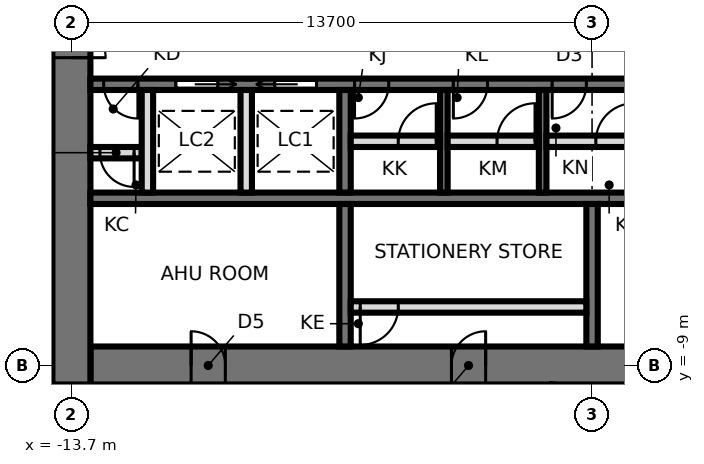
"""IFC4 building model, lengths in metres.
Left out: names, types, materials, properties, quantities, classifications, styles, units other than length and angle.
Written with IfcOpenShell. Run it as: python <this file> out.ifc"""

import sys

from ifc_helpers import new_model, si_unit, direction, frame, frame_2d, origin, place, context, subcontext, project, spatial, rectangle, extrude, element, fill, save


model = new_model("IFC4")
c1 = context("Model", 3, precision=1e-05, world=origin(), true_north=direction((0.0, 1.0)))
c2 = subcontext(c1, "Body", "Model", "MODEL_VIEW")
j1 = project(units=[si_unit("LENGTHUNIT", "METRE"), si_unit("PLANEANGLEUNIT", "RADIAN")], contexts=[c1])
p1 = place(None, origin())
s1 = spatial("IfcSite", under=j1, at=p1, CompositionType="ELEMENT")
p2 = place(p1, origin())
s2 = spatial("IfcBuilding", under=s1, at=p2, CompositionType="ELEMENT")
p3 = place(p2, frame((0.0, 0.0, 172.1)))
s3 = spatial("IfcBuildingStorey", under=s2, at=p3, CompositionType="ELEMENT", Elevation=172.1)
p4 = place(p3, frame((-13.2, -9.0, 0.0), z_axis=(0.0, 0.0, 1.0), x_axis=(1.0, 0.0, 0.0)))
e1 = element("IfcWall", 1, at=p4, inside=s3, PredefinedType="SHEAR", context=c2, shape_type="SweptSolid", body=[
    extrude(rectangle(XDim=26.4, YDim=1.0, at=frame_2d((13.2, 0.0))), origin(), (0.0, 0.0, 1.0), 3.9),
])
p5 = place(p4, frame((2.65, 0.0, 0.0)))
e2 = element("IfcOpeningElement", 2, at=p5, cuts=e1, PredefinedType="OPENING", context=c2, shape_type="SweptSolid", body=[
    extrude(rectangle(XDim=0.9, YDim=2.1, at=frame_2d((0.45, 1.05))), frame((0.0, 0.51, 0.0), z_axis=(0.0, -1.0, 0.0), x_axis=(1.0, 0.0, 0.0)), (0.0, 0.0, 1.0), 1.02),
])
p6 = place(p4, frame((9.5, 0.0, 0.0)))
e3 = element("IfcOpeningElement", 3, at=p6, cuts=e1, PredefinedType="OPENING", context=c2, shape_type="SweptSolid", body=[
    extrude(rectangle(XDim=0.9, YDim=2.1, at=frame_2d((0.45, 1.05))), frame((0.0, 0.51, 0.0), z_axis=(0.0, -1.0, 0.0), x_axis=(1.0, 0.0, 0.0)), (0.0, 0.0, 1.0), 1.02),
])
p7 = place(p4, frame((16.0, 0.0, 0.0)))
e4 = element("IfcOpeningElement", 4, at=p7, cuts=e1, PredefinedType="OPENING", context=c2, shape_type="SweptSolid", body=[
    extrude(rectangle(XDim=0.9, YDim=2.1, at=frame_2d((0.45, 1.05))), frame((0.0, 0.51, 0.0), z_axis=(0.0, -1.0, 0.0), x_axis=(1.0, 0.0, 0.0)), (0.0, 0.0, 1.0), 1.02),
])
p8 = place(p4, frame((22.85, 0.0, 0.0)))
e5 = element("IfcOpeningElement", 5, at=p8, cuts=e1, PredefinedType="OPENING", context=c2, shape_type="SweptSolid", body=[
    extrude(rectangle(XDim=0.9, YDim=2.1, at=frame_2d((0.45, 1.05))), frame((0.0, 0.51, 0.0), z_axis=(0.0, -1.0, 0.0), x_axis=(1.0, 0.0, 0.0)), (0.0, 0.0, 1.0), 1.02),
])
p9 = place(p3, frame((-13.7, 9.5, 0.0), z_axis=(0.0, 0.0, 1.0), x_axis=(0.0, -1.0, 0.0)))
e6 = element("IfcWall", 6, at=p9, inside=s3, PredefinedType="SHEAR", context=c2, shape_type="SweptSolid", body=[
    extrude(rectangle(XDim=19.0, YDim=1.0, at=frame_2d((9.5, 0.0))), origin(), (0.0, 0.0, 1.0), 3.9),
])
p10 = place(p9, frame((8.6, 0.0, 0.0)))
e7 = element("IfcOpeningElement", 7, at=p10, cuts=e6, PredefinedType="OPENING", context=c2, shape_type="SweptSolid", body=[
    extrude(rectangle(XDim=1.8, YDim=2.4, at=frame_2d((0.9, 1.2))), frame((0.0, 0.51, 0.0), z_axis=(0.0, -1.0, 0.0), x_axis=(1.0, 0.0, 0.0)), (0.0, 0.0, 1.0), 1.02),
])
p11 = place(p3, frame((-13.2, -1.6, 0.0), z_axis=(0.0, 0.0, 1.0), x_axis=(1.0, 0.0, 0.0)))
e8 = element("IfcWall", 8, at=p11, inside=s3, PredefinedType="SHEAR", context=c2, shape_type="SweptSolid", body=[
    extrude(rectangle(XDim=26.4, YDim=0.3, at=frame_2d((13.2, 0.0))), origin(), (0.0, 0.0, 1.0), 3.9),
])
p12 = place(p11, frame((25.15, 0.0, 0.0)))
e9 = element("IfcOpeningElement", 9, at=p12, cuts=e8, PredefinedType="OPENING", context=c2, shape_type="SweptSolid", body=[
    extrude(rectangle(XDim=1.0, YDim=2.1, at=frame_2d((0.5, 1.05))), frame((0.0, 0.16, 0.0), z_axis=(0.0, -1.0, 0.0), x_axis=(1.0, 0.0, 0.0)), (0.0, 0.0, 1.0), 0.32),
])
p13 = place(p11, frame((6.95, 0.0, 0.0)))
e10 = element("IfcOpeningElement", 10, at=p13, cuts=e8, PredefinedType="OPENING", context=c2, shape_type="SweptSolid", body=[
    extrude(rectangle(XDim=0.9, YDim=2.1, at=frame_2d((0.45, 1.05))), frame((0.0, 0.16, 0.0), z_axis=(0.0, -1.0, 0.0), x_axis=(1.0, 0.0, 0.0)), (0.0, 0.0, 1.0), 0.32),
])
p14 = place(p11, frame((9.55, 0.0, 0.0)))
e11 = element("IfcOpeningElement", 11, at=p14, cuts=e8, PredefinedType="OPENING", context=c2, shape_type="SweptSolid", body=[
    extrude(rectangle(XDim=0.9, YDim=2.1, at=frame_2d((0.45, 1.05))), frame((0.0, 0.16, 0.0), z_axis=(0.0, -1.0, 0.0), x_axis=(1.0, 0.0, 0.0)), (0.0, 0.0, 1.0), 0.32),
])
p15 = place(p11, frame((12.15, 0.0, 0.0)))
e12 = element("IfcOpeningElement", 12, at=p15, cuts=e8, PredefinedType="OPENING", context=c2, shape_type="SweptSolid", body=[
    extrude(rectangle(XDim=0.9, YDim=2.1, at=frame_2d((0.45, 1.05))), frame((0.0, 0.16, 0.0), z_axis=(0.0, -1.0, 0.0), x_axis=(1.0, 0.0, 0.0)), (0.0, 0.0, 1.0), 0.32),
])
p16 = place(p11, frame((15.25, 0.0, 0.0)))
e13 = element("IfcOpeningElement", 13, at=p16, cuts=e8, PredefinedType="OPENING", context=c2, shape_type="SweptSolid", body=[
    extrude(rectangle(XDim=1.1, YDim=2.3, at=frame_2d((0.55, 1.15))), frame((0.0, 0.16, 0.0), z_axis=(0.0, -1.0, 0.0), x_axis=(1.0, 0.0, 0.0)), (0.0, 0.0, 1.0), 0.32),
])
p17 = place(p11, frame((17.85, 0.0, 0.0)))
e14 = element("IfcOpeningElement", 14, at=p17, cuts=e8, PredefinedType="OPENING", context=c2, shape_type="SweptSolid", body=[
    extrude(rectangle(XDim=1.1, YDim=2.3, at=frame_2d((0.55, 1.15))), frame((0.0, 0.16, 0.0), z_axis=(0.0, -1.0, 0.0), x_axis=(1.0, 0.0, 0.0)), (0.0, 0.0, 1.0), 0.32),
])
p18 = place(p11, frame((4.85, 0.0, 0.0)))
e15 = element("IfcOpeningElement", 15, at=p18, cuts=e8, PredefinedType="OPENING", context=c2, shape_type="SweptSolid", body=[
    extrude(rectangle(XDim=1.1, YDim=2.3, at=frame_2d((0.55, 1.15))), frame((0.0, 0.16, 0.0), z_axis=(0.0, -1.0, 0.0), x_axis=(1.0, 0.0, 0.0)), (0.0, 0.0, 1.0), 0.32),
])
p19 = place(p11, frame((2.25, 0.0, 0.0)))
e16 = element("IfcOpeningElement", 16, at=p19, cuts=e8, PredefinedType="OPENING", context=c2, shape_type="SweptSolid", body=[
    extrude(rectangle(XDim=1.1, YDim=2.3, at=frame_2d((0.55, 1.15))), frame((0.0, 0.16, 0.0), z_axis=(0.0, -1.0, 0.0), x_axis=(1.0, 0.0, 0.0)), (0.0, 0.0, 1.0), 0.32),
])
p20 = place(p11, frame((0.35, 0.0, 0.0)))
e17 = element("IfcOpeningElement", 17, at=p20, cuts=e8, PredefinedType="OPENING", context=c2, shape_type="SweptSolid", body=[
    extrude(rectangle(XDim=0.9, YDim=2.1, at=frame_2d((0.45, 1.05))), frame((0.0, 0.16, 0.0), z_axis=(0.0, -1.0, 0.0), x_axis=(1.0, 0.0, 0.0)), (0.0, 0.0, 1.0), 0.32),
])
p21 = place(p3, frame((-13.2, -4.6, 0.0), z_axis=(0.0, 0.0, 1.0), x_axis=(1.0, 0.0, 0.0)))
e18 = element("IfcWall", 18, at=p21, inside=s3, PredefinedType="SHEAR", context=c2, shape_type="SweptSolid", body=[
    extrude(rectangle(XDim=26.4, YDim=0.3, at=frame_2d((13.2, 0.0))), origin(), (0.0, 0.0, 1.0), 3.9),
])
p22 = place(p3, frame((-6.5, -1.75, 0.0), z_axis=(0.0, 0.0, 1.0), x_axis=(0.0, -1.0, 0.0)))
e19 = element("IfcWall", 19, at=p22, inside=s3, PredefinedType="SHEAR", context=c2, shape_type="SweptSolid", body=[
    extrude(rectangle(XDim=2.7, YDim=0.3, at=frame_2d((1.35, 0.0))), origin(), (0.0, 0.0, 1.0), 3.9),
])
p23 = place(p3, frame((-6.5, -4.75, 0.0), z_axis=(0.0, 0.0, 1.0), x_axis=(0.0, -1.0, 0.0)))
e20 = element("IfcWall", 20, at=p23, inside=s3, PredefinedType="SHEAR", context=c2, shape_type="SweptSolid", body=[
    extrude(rectangle(XDim=3.75, YDim=0.3, at=frame_2d((1.875, 0.0))), origin(), (0.0, 0.0, 1.0), 3.9),
])
for number, where, z_axis, x_axis in (
    (21, (-3.9, -1.75, 0.0), (0.0, 0.0, 1.0), (0.0, -1.0, 0.0)),
    (22, (-1.3, -1.75, 0.0), (0.0, 0.0, 1.0), (0.0, -1.0, 0.0)),
):
    element("IfcWall", number, at=place(p3, frame(where, z_axis=z_axis, x_axis=x_axis)), inside=s3, PredefinedType="SHEAR", context=c2, shape_type="SweptSolid", body=[
        extrude(rectangle(XDim=2.7, YDim=0.2, at=frame_2d((1.35, 0.0))), origin(), (0.0, 0.0, 1.0), 3.9),
    ])
p24 = place(p3, frame((0.0, -4.75, 0.0), z_axis=(0.0, 0.0, 1.0), x_axis=(0.0, -1.0, 0.0)))
e23 = element("IfcWall", 23, at=p24, inside=s3, PredefinedType="SHEAR", context=c2, shape_type="SweptSolid", body=[
    extrude(rectangle(XDim=3.75, YDim=0.3, at=frame_2d((1.875, 0.0))), origin(), (0.0, 0.0, 1.0), 3.9),
])
p25 = place(p3, frame((-6.35, -3.1, 0.0), z_axis=(0.0, 0.0, 1.0), x_axis=(1.0, 0.0, 0.0)))
e24 = element("IfcWall", 24, at=p25, inside=s3, PredefinedType="PARTITIONING", context=c2, shape_type="SweptSolid", body=[
    extrude(rectangle(XDim=2.35, YDim=0.3, at=frame_2d((1.175, 0.0))), origin(), (0.0, 0.0, 1.0), 3.74),
])
p26 = place(p25, frame((1.25, 0.0, 0.0)))
e25 = element("IfcOpeningElement", 25, at=p26, cuts=e24, PredefinedType="OPENING", context=c2, shape_type="SweptSolid", body=[
    extrude(rectangle(XDim=1.0, YDim=2.4, at=frame_2d((0.5, 1.2))), frame((0.0, 0.16, 0.0), z_axis=(0.0, -1.0, 0.0), x_axis=(1.0, 0.0, 0.0)), (0.0, 0.0, 1.0), 0.32),
])
p27 = place(p3, frame((-3.8, -3.1, 0.0), z_axis=(0.0, 0.0, 1.0), x_axis=(1.0, 0.0, 0.0)))
e26 = element("IfcWall", 26, at=p27, inside=s3, PredefinedType="PARTITIONING", context=c2, shape_type="SweptSolid", body=[
    extrude(rectangle(XDim=2.4, YDim=0.3, at=frame_2d((1.2, 0.0))), origin(), (0.0, 0.0, 1.0), 3.74),
])
p28 = place(p27, frame((1.3, 0.0, 0.0)))
e27 = element("IfcOpeningElement", 27, at=p28, cuts=e26, PredefinedType="OPENING", context=c2, shape_type="SweptSolid", body=[
    extrude(rectangle(XDim=1.0, YDim=2.4, at=frame_2d((0.5, 1.2))), frame((0.0, 0.16, 0.0), z_axis=(0.0, -1.0, 0.0), x_axis=(1.0, 0.0, 0.0)), (0.0, 0.0, 1.0), 0.32),
])
p29 = place(p3, frame((-1.2, -3.1, 0.0), z_axis=(0.0, 0.0, 1.0), x_axis=(1.0, 0.0, 0.0)))
e28 = element("IfcWall", 28, at=p29, inside=s3, PredefinedType="PARTITIONING", context=c2, shape_type="SweptSolid", body=[
    extrude(rectangle(XDim=2.4, YDim=0.3, at=frame_2d((1.2, 0.0))), origin(), (0.0, 0.0, 1.0), 3.74),
])
p30 = place(p29, frame((1.3, 0.0, 0.0)))
e29 = element("IfcOpeningElement", 29, at=p30, cuts=e28, PredefinedType="OPENING", context=c2, shape_type="SweptSolid", body=[
    extrude(rectangle(XDim=1.0, YDim=2.4, at=frame_2d((0.5, 1.2))), frame((0.0, 0.16, 0.0), z_axis=(0.0, -1.0, 0.0), x_axis=(1.0, 0.0, 0.0)), (0.0, 0.0, 1.0), 0.32),
])
p31 = place(p3, frame((-6.35, -7.46, 0.0), z_axis=(0.0, 0.0, 1.0), x_axis=(1.0, 0.0, 0.0)))
e30 = element("IfcWall", 30, at=p31, inside=s3, PredefinedType="PARTITIONING", context=c2, shape_type="SweptSolid", body=[
    extrude(rectangle(XDim=6.2, YDim=0.3, at=frame_2d((3.1, 0.0))), origin(), (0.0, 0.0, 1.0), 3.74),
])
p32 = place(p31, frame((0.25, 0.0, 0.0)))
e31 = element("IfcOpeningElement", 31, at=p32, cuts=e30, PredefinedType="OPENING", context=c2, shape_type="SweptSolid", body=[
    extrude(rectangle(XDim=1.0, YDim=2.4, at=frame_2d((0.5, 1.2))), frame((0.0, 0.16, 0.0), z_axis=(0.0, -1.0, 0.0), x_axis=(1.0, 0.0, 0.0)), (0.0, 0.0, 1.0), 0.32),
])
p33 = place(p3, frame((-13.2, -3.4, 0.0), z_axis=(0.0, 0.0, 1.0), x_axis=(1.0, 0.0, 0.0)))
e32 = element("IfcWall", 32, at=p33, inside=s3, PredefinedType="SOLIDWALL", context=c2, shape_type="SweptSolid", body=[
    extrude(rectangle(XDim=1.35, YDim=0.3, at=frame_2d((0.675, 0.0))), origin(), (0.0, 0.0, 1.0), 3.74),
])
p34 = place(p33, frame((0.25, 0.0, 0.0)))
e33 = element("IfcOpeningElement", 33, at=p34, cuts=e32, PredefinedType="OPENING", context=c2, shape_type="SweptSolid", body=[
    extrude(rectangle(XDim=0.9, YDim=2.1, at=frame_2d((0.45, 1.05))), frame((0.0, 0.16, 0.0), z_axis=(0.0, -1.0, 0.0), x_axis=(1.0, 0.0, 0.0)), (0.0, 0.0, 1.0), 0.32),
])
for number, where, z_axis, x_axis in (
    (34, (-9.1, -1.75, 0.0), (0.0, 0.0, 1.0), (0.0, -1.0, 0.0)),
    (35, (-11.7, -1.75, 0.0), (0.0, 0.0, 1.0), (0.0, -1.0, 0.0)),
):
    element("IfcWall", number, at=place(p3, frame(where, z_axis=z_axis, x_axis=x_axis)), inside=s3, PredefinedType="SOLIDWALL", context=c2, shape_type="SweptSolid", body=[
        extrude(rectangle(XDim=2.7, YDim=0.3, at=frame_2d((1.35, 0.0))), origin(), (0.0, 0.0, 1.0), 3.74),
    ])
p35 = place(p3, frame((-2.196, -20.896, 0.0), z_axis=(0.0, 0.0, 1.0), x_axis=(0.104527293836, 0.99452201828, 0.0)))
e36 = element("IfcWall", 36, at=p35, inside=s3, PredefinedType="PARTITIONING", context=c2, shape_type="SweptSolid", body=[
    extrude(rectangle(XDim=11.459, YDim=0.12, at=frame_2d((5.729, 0.0))), origin(), (0.0, 0.0, 1.0), 3.74),
])
p36 = place(p35, frame((5.254, 0.0, 0.0)))
e37 = element("IfcOpeningElement", 37, at=p36, cuts=e36, PredefinedType="OPENING", context=c2, shape_type="SweptSolid", body=[
    extrude(rectangle(XDim=1.0, YDim=2.4, at=frame_2d((0.5, 1.2))), frame((0.0, 0.07, 0.0), z_axis=(0.0, -1.0, 0.0), x_axis=(1.0, 0.0, 0.0)), (0.0, 0.0, 1.0), 0.14),
])
p37 = place(p10, origin())
e38 = element("IfcDoor", 38, at=p37, inside=s3, OperationType="DOUBLE_DOOR_SINGLE_SWING", PredefinedType="DOOR", context=c2, shape_type="SweptSolid", body=[
    extrude(rectangle(XDim=1.72, YDim=2.36, at=frame_2d((0.9, 1.18))), frame((0.0, 0.025, 0.0), z_axis=(0.0, -1.0, 0.0), x_axis=(1.0, 0.0, 0.0)), (0.0, 0.0, 1.0), 0.05),
    extrude(rectangle(XDim=0.04, YDim=2.4, at=frame_2d((0.02, 1.2))), frame((0.0, 0.25, 0.0), z_axis=(0.0, -1.0, 0.0), x_axis=(1.0, 0.0, 0.0)), (0.0, 0.0, 1.0), 0.5),
    extrude(rectangle(XDim=0.04, YDim=2.4, at=frame_2d((1.78, 1.2))), frame((0.0, 0.25, 0.0), z_axis=(0.0, -1.0, 0.0), x_axis=(1.0, 0.0, 0.0)), (0.0, 0.0, 1.0), 0.5),
    extrude(rectangle(XDim=1.72, YDim=0.04, at=frame_2d((0.9, 2.38))), frame((0.0, 0.25, 0.0), z_axis=(0.0, -1.0, 0.0), x_axis=(1.0, 0.0, 0.0)), (0.0, 0.0, 1.0), 0.5),
])
fill(e7, e38)
p38 = place(p26, origin())
e39 = element("IfcDoor", 39, at=p38, inside=s3, OperationType="SINGLE_SWING_RIGHT", PredefinedType="DOOR", context=c2, shape_type="SweptSolid", body=[
    extrude(rectangle(XDim=1.0, YDim=2.4, at=frame_2d((0.5, 1.2))), frame((0.0, 0.025, 0.0), z_axis=(0.0, -1.0, 0.0), x_axis=(1.0, 0.0, 0.0)), (0.0, 0.0, 1.0), 0.05),
])
fill(e25, e39)
p39 = place(p13, frame((0.9, 0.0, 0.0), z_axis=(0.0, 0.0, 1.0), x_axis=(-1.0, 0.0, 0.0)))
e40 = element("IfcDoor", 40, at=p39, inside=s3, OperationType="SINGLE_SWING_RIGHT", PredefinedType="DOOR", context=c2, shape_type="SweptSolid", body=[
    extrude(rectangle(XDim=0.9, YDim=2.1, at=frame_2d((0.45, 1.05))), frame((0.0, 0.025, 0.0), z_axis=(0.0, -1.0, 0.0), x_axis=(1.0, 0.0, 0.0)), (0.0, 0.0, 1.0), 0.05),
])
fill(e10, e40)
p40 = place(p28, origin())
e41 = element("IfcDoor", 41, at=p40, inside=s3, OperationType="SINGLE_SWING_RIGHT", PredefinedType="DOOR", context=c2, shape_type="SweptSolid", body=[
    extrude(rectangle(XDim=1.0, YDim=2.4, at=frame_2d((0.5, 1.2))), frame((0.0, 0.025, 0.0), z_axis=(0.0, -1.0, 0.0), x_axis=(1.0, 0.0, 0.0)), (0.0, 0.0, 1.0), 0.05),
])
fill(e27, e41)
p41 = place(p14, frame((0.9, 0.0, 0.0), z_axis=(0.0, 0.0, 1.0), x_axis=(-1.0, 0.0, 0.0)))
e42 = element("IfcDoor", 42, at=p41, inside=s3, OperationType="SINGLE_SWING_RIGHT", PredefinedType="DOOR", context=c2, shape_type="SweptSolid", body=[
    extrude(rectangle(XDim=0.9, YDim=2.1, at=frame_2d((0.45, 1.05))), frame((0.0, 0.025, 0.0), z_axis=(0.0, -1.0, 0.0), x_axis=(1.0, 0.0, 0.0)), (0.0, 0.0, 1.0), 0.05),
])
fill(e11, e42)
p42 = place(p30, origin())
e43 = element("IfcDoor", 43, at=p42, inside=s3, OperationType="SINGLE_SWING_RIGHT", PredefinedType="DOOR", context=c2, shape_type="SweptSolid", body=[
    extrude(rectangle(XDim=1.0, YDim=2.4, at=frame_2d((0.5, 1.2))), frame((0.0, 0.025, 0.0), z_axis=(0.0, -1.0, 0.0), x_axis=(1.0, 0.0, 0.0)), (0.0, 0.0, 1.0), 0.05),
])
fill(e29, e43)
p43 = place(p15, frame((0.9, 0.0, 0.0), z_axis=(0.0, 0.0, 1.0), x_axis=(-1.0, 0.0, 0.0)))
e44 = element("IfcDoor", 44, at=p43, inside=s3, OperationType="SINGLE_SWING_RIGHT", PredefinedType="DOOR", context=c2, shape_type="SweptSolid", body=[
    extrude(rectangle(XDim=0.9, YDim=2.1, at=frame_2d((0.45, 1.05))), frame((0.0, 0.025, 0.0), z_axis=(0.0, -1.0, 0.0), x_axis=(1.0, 0.0, 0.0)), (0.0, 0.0, 1.0), 0.05),
])
fill(e12, e44)
p44 = place(p18, frame((1.1, 0.0, 0.0), z_axis=(0.0, 0.0, 1.0), x_axis=(-1.0, 0.0, 0.0)))
e45 = element("IfcDoor", 45, at=p44, inside=s3, OperationType="SLIDING_TO_RIGHT", PredefinedType="DOOR", context=c2, shape_type="SweptSolid", body=[
    extrude(rectangle(XDim=1.1, YDim=2.3, at=frame_2d((0.55, 1.15))), frame((0.0, 0.025, 0.0), z_axis=(0.0, -1.0, 0.0), x_axis=(1.0, 0.0, 0.0)), (0.0, 0.0, 1.0), 0.05),
])
fill(e15, e45)
p45 = place(p19, frame((1.1, 0.0, 0.0), z_axis=(0.0, 0.0, 1.0), x_axis=(-1.0, 0.0, 0.0)))
e46 = element("IfcDoor", 46, at=p45, inside=s3, OperationType="SLIDING_TO_LEFT", PredefinedType="DOOR", context=c2, shape_type="SweptSolid", body=[
    extrude(rectangle(XDim=1.1, YDim=2.3, at=frame_2d((0.55, 1.15))), frame((0.0, 0.025, 0.0), z_axis=(0.0, -1.0, 0.0), x_axis=(1.0, 0.0, 0.0)), (0.0, 0.0, 1.0), 0.05),
])
fill(e16, e46)
p46 = place(p20, frame((0.9, 0.0, 0.0), z_axis=(0.0, 0.0, 1.0), x_axis=(-1.0, 0.0, 0.0)))
e47 = element("IfcDoor", 47, at=p46, inside=s3, OperationType="SINGLE_SWING_LEFT", PredefinedType="DOOR", context=c2, shape_type="SweptSolid", body=[
    extrude(rectangle(XDim=0.9, YDim=2.1, at=frame_2d((0.45, 1.05))), frame((0.0, 0.025, 0.0), z_axis=(0.0, -1.0, 0.0), x_axis=(1.0, 0.0, 0.0)), (0.0, 0.0, 1.0), 0.05),
])
fill(e17, e47)
p47 = place(p5, origin())
e48 = element("IfcDoor", 48, at=p47, inside=s3, OperationType="SINGLE_SWING_LEFT", PredefinedType="DOOR", context=c2, shape_type="SweptSolid", body=[
    extrude(rectangle(XDim=0.82, YDim=2.06, at=frame_2d((0.45, 1.03))), frame((0.0, 0.025, 0.0), z_axis=(0.0, -1.0, 0.0), x_axis=(1.0, 0.0, 0.0)), (0.0, 0.0, 1.0), 0.05),
    extrude(rectangle(XDim=0.04, YDim=2.1, at=frame_2d((0.02, 1.05))), frame((0.0, 0.25, 0.0), z_axis=(0.0, -1.0, 0.0), x_axis=(1.0, 0.0, 0.0)), (0.0, 0.0, 1.0), 0.5),
    extrude(rectangle(XDim=0.04, YDim=2.1, at=frame_2d((0.88, 1.05))), frame((0.0, 0.25, 0.0), z_axis=(0.0, -1.0, 0.0), x_axis=(1.0, 0.0, 0.0)), (0.0, 0.0, 1.0), 0.5),
    extrude(rectangle(XDim=0.82, YDim=0.04, at=frame_2d((0.45, 2.08))), frame((0.0, 0.25, 0.0), z_axis=(0.0, -1.0, 0.0), x_axis=(1.0, 0.0, 0.0)), (0.0, 0.0, 1.0), 0.5),
])
fill(e2, e48)
p48 = place(p6, origin())
e49 = element("IfcDoor", 49, at=p48, inside=s3, OperationType="SINGLE_SWING_RIGHT", PredefinedType="DOOR", context=c2, shape_type="SweptSolid", body=[
    extrude(rectangle(XDim=0.82, YDim=2.06, at=frame_2d((0.45, 1.03))), frame((0.0, 0.025, 0.0), z_axis=(0.0, -1.0, 0.0), x_axis=(1.0, 0.0, 0.0)), (0.0, 0.0, 1.0), 0.05),
    extrude(rectangle(XDim=0.04, YDim=2.1, at=frame_2d((0.02, 1.05))), frame((0.0, 0.25, 0.0), z_axis=(0.0, -1.0, 0.0), x_axis=(1.0, 0.0, 0.0)), (0.0, 0.0, 1.0), 0.5),
    extrude(rectangle(XDim=0.04, YDim=2.1, at=frame_2d((0.88, 1.05))), frame((0.0, 0.25, 0.0), z_axis=(0.0, -1.0, 0.0), x_axis=(1.0, 0.0, 0.0)), (0.0, 0.0, 1.0), 0.5),
    extrude(rectangle(XDim=0.82, YDim=0.04, at=frame_2d((0.45, 2.08))), frame((0.0, 0.25, 0.0), z_axis=(0.0, -1.0, 0.0), x_axis=(1.0, 0.0, 0.0)), (0.0, 0.0, 1.0), 0.5),
])
fill(e3, e49)
p49 = place(p32, frame((1.0, 0.0, 0.0), z_axis=(0.0, 0.0, 1.0), x_axis=(-1.0, 0.0, 0.0)))
e50 = element("IfcDoor", 50, at=p49, inside=s3, OperationType="SINGLE_SWING_RIGHT", PredefinedType="DOOR", context=c2, shape_type="SweptSolid", body=[
    extrude(rectangle(XDim=1.0, YDim=2.4, at=frame_2d((0.5, 1.2))), frame((0.0, 0.025, 0.0), z_axis=(0.0, -1.0, 0.0), x_axis=(1.0, 0.0, 0.0)), (0.0, 0.0, 1.0), 0.05),
])
fill(e31, e50)
p50 = place(p34, frame((0.9, 0.0, 0.0), z_axis=(0.0, 0.0, 1.0), x_axis=(-1.0, 0.0, 0.0)))
e51 = element("IfcDoor", 51, at=p50, inside=s3, OperationType="SINGLE_SWING_LEFT", PredefinedType="DOOR", context=c2, shape_type="SweptSolid", body=[
    extrude(rectangle(XDim=0.9, YDim=2.1, at=frame_2d((0.45, 1.05))), frame((0.0, 0.025, 0.0), z_axis=(0.0, -1.0, 0.0), x_axis=(1.0, 0.0, 0.0)), (0.0, 0.0, 1.0), 0.05),
])
fill(e33, e51)
save(model, sys.argv[1])
